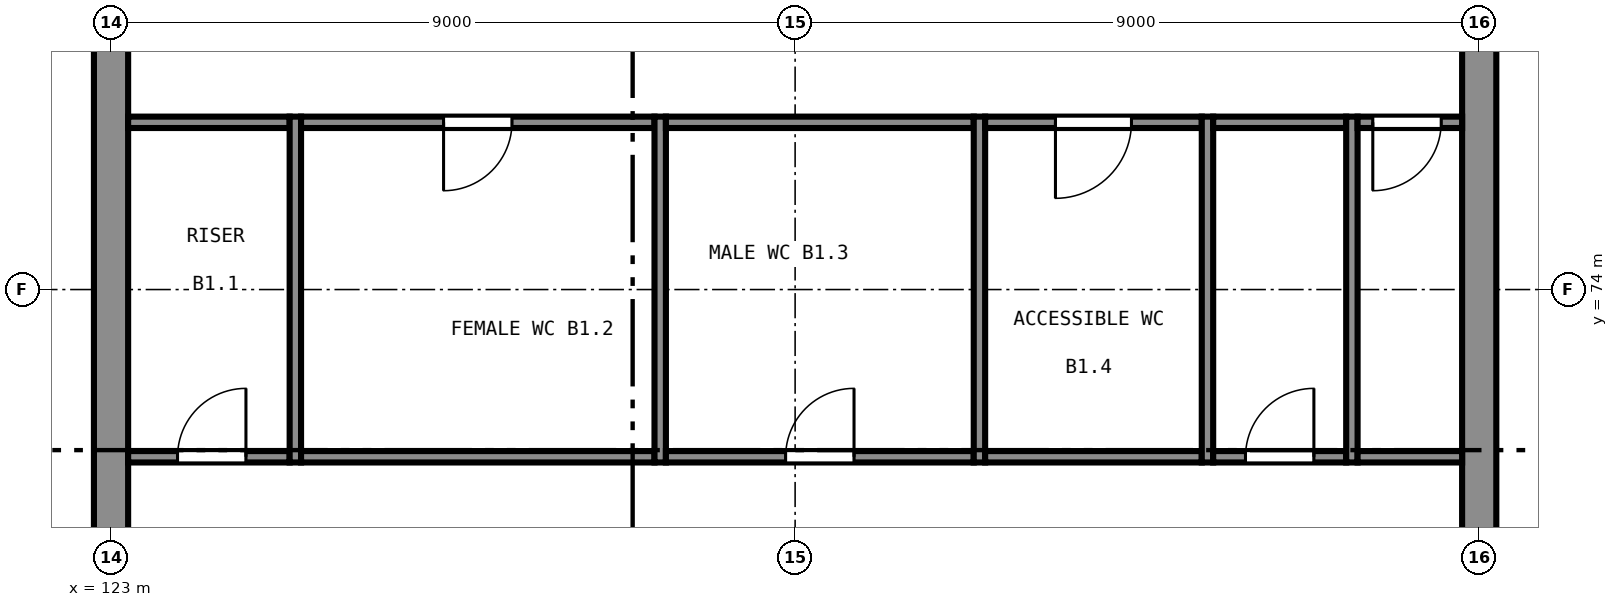
"""IFC4 building model, lengths in metres.
Left out: names, types, materials, properties, quantities, classifications, styles, units other than length and angle.
Written with IfcOpenShell. Run it as: python <this file> out.ifc"""

import sys

from ifc_helpers import new_model, si_unit, direction, frame, frame_2d, origin, place, context, subcontext, project, spatial, rectangle, extrude, element, fill, save


model = new_model("IFC4")
c1 = context("Model", 3, precision=1e-05, world=origin(), true_north=direction((0.0, 1.0)))
c2 = subcontext(c1, "Body", "Model", "MODEL_VIEW")
j1 = project(units=[si_unit("LENGTHUNIT", "METRE"), si_unit("PLANEANGLEUNIT", "RADIAN")], contexts=[c1])
p1 = place(None, origin())
s1 = spatial("IfcSite", under=j1, at=p1, CompositionType="ELEMENT")
p2 = place(p1, origin())
s2 = spatial("IfcBuilding", under=s1, at=p2, CompositionType="ELEMENT")
p3 = place(p2, frame((0.0, 0.0, -5.0)))
s3 = spatial("IfcBuildingStorey", under=s2, at=p3, CompositionType="ELEMENT", Elevation=-5.0)
p4 = place(p3, frame((141.0, 65.225, 0.0), z_axis=(0.0, 0.0, 1.0), x_axis=(0.0, 1.0, 0.0)))
e1 = element("IfcWall", 1, at=p4, inside=s3, PredefinedType="SHEAR", context=c2, shape_type="SweptSolid", body=[
    extrude(rectangle(XDim=17.55, YDim=0.45, at=frame_2d((8.775, 0.0))), origin(), (0.0, 0.0, 1.0), 5.0),
])
p5 = place(p4, frame((4.3, 0.0, 0.0)))
e2 = element("IfcOpeningElement", 2, at=p5, cuts=e1, PredefinedType="OPENING", context=c2, shape_type="SweptSolid", body=[
    extrude(rectangle(XDim=1.2, YDim=2.1, at=frame_2d((0.6, 1.05))), frame((0.0, 0.235, 0.0), z_axis=(0.0, -1.0, 0.0), x_axis=(1.0, 0.0, 0.0)), (0.0, 0.0, 1.0), 0.47),
])
p6 = place(p4, frame((12.05, 0.0, 0.0)))
e3 = element("IfcOpeningElement", 3, at=p6, cuts=e1, PredefinedType="OPENING", context=c2, shape_type="SweptSolid", body=[
    extrude(rectangle(XDim=1.2, YDim=2.1, at=frame_2d((0.6, 1.05))), frame((0.0, 0.235, 0.0), z_axis=(0.0, -1.0, 0.0), x_axis=(1.0, 0.0, 0.0)), (0.0, 0.0, 1.0), 0.47),
])
p7 = place(p3, frame((123.0, 82.775, 0.0), z_axis=(0.0, 0.0, 1.0), x_axis=(0.0, -1.0, 0.0)))
e4 = element("IfcWall", 4, at=p7, inside=s3, PredefinedType="SHEAR", context=c2, shape_type="SweptSolid", body=[
    extrude(rectangle(XDim=17.55, YDim=0.45, at=frame_2d((8.775, 0.0))), origin(), (0.0, 0.0, 1.0), 5.0),
])
p8 = place(p7, frame((12.05, 0.0, 0.0)))
e5 = element("IfcOpeningElement", 5, at=p8, cuts=e4, PredefinedType="OPENING", context=c2, shape_type="SweptSolid", body=[
    extrude(rectangle(XDim=1.2, YDim=2.1, at=frame_2d((0.6, 1.05))), frame((0.0, 0.235, 0.0), z_axis=(0.0, -1.0, 0.0), x_axis=(1.0, 0.0, 0.0)), (0.0, 0.0, 1.0), 0.47),
])
p9 = place(p7, frame((4.3, 0.0, 0.0)))
e6 = element("IfcOpeningElement", 6, at=p9, cuts=e4, PredefinedType="OPENING", context=c2, shape_type="SweptSolid", body=[
    extrude(rectangle(XDim=1.2, YDim=2.1, at=frame_2d((0.6, 1.05))), frame((0.0, 0.235, 0.0), z_axis=(0.0, -1.0, 0.0), x_axis=(1.0, 0.0, 0.0)), (0.0, 0.0, 1.0), 0.47),
])
p10 = place(p3, frame((125.425, 71.725, 0.0), z_axis=(0.0, 0.0, 1.0), x_axis=(0.0, 1.0, 0.0)))
e7 = element("IfcWall", 7, at=p10, inside=s3, PredefinedType="PARTITIONING", context=c2, shape_type="SweptSolid", body=[
    extrude(rectangle(XDim=4.55, YDim=0.15, at=frame_2d((2.275, 0.0))), origin(), (0.0, 0.0, 1.0), 4.58),
])
p11 = place(p3, frame((123.225, 71.8, 0.0), z_axis=(0.0, 0.0, 1.0), x_axis=(1.0, 0.0, 0.0)))
e8 = element("IfcWall", 8, at=p11, inside=s3, PredefinedType="PARTITIONING", context=c2, shape_type="SweptSolid", body=[
    extrude(rectangle(XDim=2.125, YDim=0.15, at=frame_2d((1.062, 0.0))), origin(), (0.0, 0.0, 1.0), 4.58),
])
p12 = place(p11, frame((0.65, 0.0, 0.0)))
e9 = element("IfcOpeningElement", 9, at=p12, cuts=e8, PredefinedType="OPENING", context=c2, shape_type="SweptSolid", body=[
    extrude(rectangle(XDim=0.9, YDim=2.1, at=frame_2d((0.45, 1.05))), frame((0.0, 0.085, 0.0), z_axis=(0.0, -1.0, 0.0), x_axis=(1.0, 0.0, 0.0)), (0.0, 0.0, 1.0), 0.17),
])
p13 = place(p3, frame((123.225, 76.2, 0.0), z_axis=(0.0, 0.0, 1.0), x_axis=(1.0, 0.0, 0.0)))
e10 = element("IfcWall", 10, at=p13, inside=s3, PredefinedType="PARTITIONING", context=c2, shape_type="SweptSolid", body=[
    extrude(rectangle(XDim=2.125, YDim=0.15, at=frame_2d((1.062, 0.0))), origin(), (0.0, 0.0, 1.0), 4.58),
])
p14 = place(p3, frame((130.225, 71.725, 0.0), z_axis=(0.0, 0.0, 1.0), x_axis=(0.0, 1.0, 0.0)))
e11 = element("IfcWall", 11, at=p14, inside=s3, PredefinedType="PARTITIONING", context=c2, shape_type="SweptSolid", body=[
    extrude(rectangle(XDim=4.55, YDim=0.15, at=frame_2d((2.275, 0.0))), origin(), (0.0, 0.0, 1.0), 4.58),
])
p15 = place(p3, frame((125.5, 71.8, 0.0), z_axis=(0.0, 0.0, 1.0), x_axis=(1.0, 0.0, 0.0)))
e12 = element("IfcWall", 12, at=p15, inside=s3, PredefinedType="PARTITIONING", context=c2, shape_type="SweptSolid", body=[
    extrude(rectangle(XDim=4.65, YDim=0.15, at=frame_2d((2.325, 0.0))), origin(), (0.0, 0.0, 1.0), 4.58),
])
p16 = place(p3, frame((125.5, 76.2, 0.0), z_axis=(0.0, 0.0, 1.0), x_axis=(1.0, 0.0, 0.0)))
e13 = element("IfcWall", 13, at=p16, inside=s3, PredefinedType="PARTITIONING", context=c2, shape_type="SweptSolid", body=[
    extrude(rectangle(XDim=4.65, YDim=0.15, at=frame_2d((2.325, 0.0))), origin(), (0.0, 0.0, 1.0), 4.58),
])
p17 = place(p16, frame((1.875, 0.0, 0.0)))
e14 = element("IfcOpeningElement", 14, at=p17, cuts=e13, PredefinedType="OPENING", context=c2, shape_type="SweptSolid", body=[
    extrude(rectangle(XDim=0.9, YDim=2.1, at=frame_2d((0.45, 1.05))), frame((0.0, 0.085, 0.0), z_axis=(0.0, -1.0, 0.0), x_axis=(1.0, 0.0, 0.0)), (0.0, 0.0, 1.0), 0.17),
])
p18 = place(p3, frame((134.425, 71.725, 0.0), z_axis=(0.0, 0.0, 1.0), x_axis=(0.0, 1.0, 0.0)))
e15 = element("IfcWall", 15, at=p18, inside=s3, PredefinedType="PARTITIONING", context=c2, shape_type="SweptSolid", body=[
    extrude(rectangle(XDim=4.55, YDim=0.15, at=frame_2d((2.275, 0.0))), origin(), (0.0, 0.0, 1.0), 4.58),
])
p19 = place(p3, frame((130.3, 71.8, 0.0), z_axis=(0.0, 0.0, 1.0), x_axis=(1.0, 0.0, 0.0)))
e16 = element("IfcWall", 16, at=p19, inside=s3, PredefinedType="PARTITIONING", context=c2, shape_type="SweptSolid", body=[
    extrude(rectangle(XDim=4.05, YDim=0.15, at=frame_2d((2.025, 0.0))), origin(), (0.0, 0.0, 1.0), 4.58),
])
p20 = place(p19, frame((1.575, 0.0, 0.0)))
e17 = element("IfcOpeningElement", 17, at=p20, cuts=e16, PredefinedType="OPENING", context=c2, shape_type="SweptSolid", body=[
    extrude(rectangle(XDim=0.9, YDim=2.1, at=frame_2d((0.45, 1.05))), frame((0.0, 0.085, 0.0), z_axis=(0.0, -1.0, 0.0), x_axis=(1.0, 0.0, 0.0)), (0.0, 0.0, 1.0), 0.17),
])
p21 = place(p3, frame((130.3, 76.2, 0.0), z_axis=(0.0, 0.0, 1.0), x_axis=(1.0, 0.0, 0.0)))
e18 = element("IfcWall", 18, at=p21, inside=s3, PredefinedType="PARTITIONING", context=c2, shape_type="SweptSolid", body=[
    extrude(rectangle(XDim=4.05, YDim=0.15, at=frame_2d((2.025, 0.0))), origin(), (0.0, 0.0, 1.0), 4.58),
])
p22 = place(p3, frame((137.425, 71.725, 0.0), z_axis=(0.0, 0.0, 1.0), x_axis=(0.0, 1.0, 0.0)))
e19 = element("IfcWall", 19, at=p22, inside=s3, PredefinedType="PARTITIONING", context=c2, shape_type="SweptSolid", body=[
    extrude(rectangle(XDim=4.55, YDim=0.15, at=frame_2d((2.275, 0.0))), origin(), (0.0, 0.0, 1.0), 4.58),
])
p23 = place(p3, frame((134.5, 71.8, 0.0), z_axis=(0.0, 0.0, 1.0), x_axis=(1.0, 0.0, 0.0)))
e20 = element("IfcWall", 20, at=p23, inside=s3, PredefinedType="PARTITIONING", context=c2, shape_type="SweptSolid", body=[
    extrude(rectangle(XDim=2.85, YDim=0.15, at=frame_2d((1.425, 0.0))), origin(), (0.0, 0.0, 1.0), 4.58),
])
p24 = place(p3, frame((134.5, 76.2, 0.0), z_axis=(0.0, 0.0, 1.0), x_axis=(1.0, 0.0, 0.0)))
e21 = element("IfcWall", 21, at=p24, inside=s3, PredefinedType="PARTITIONING", context=c2, shape_type="SweptSolid", body=[
    extrude(rectangle(XDim=2.85, YDim=0.15, at=frame_2d((1.425, 0.0))), origin(), (0.0, 0.0, 1.0), 4.58),
])
p25 = place(p24, frame((0.925, 0.0, 0.0)))
e22 = element("IfcOpeningElement", 22, at=p25, cuts=e21, PredefinedType="OPENING", context=c2, shape_type="SweptSolid", body=[
    extrude(rectangle(XDim=1.0, YDim=2.1, at=frame_2d((0.5, 1.05))), frame((0.0, 0.085, 0.0), z_axis=(0.0, -1.0, 0.0), x_axis=(1.0, 0.0, 0.0)), (0.0, 0.0, 1.0), 0.17),
])
p26 = place(p3, frame((139.325, 71.725, 0.0), z_axis=(0.0, 0.0, 1.0), x_axis=(0.0, 1.0, 0.0)))
e23 = element("IfcWall", 23, at=p26, inside=s3, PredefinedType="PARTITIONING", context=c2, shape_type="SweptSolid", body=[
    extrude(rectangle(XDim=4.55, YDim=0.15, at=frame_2d((2.275, 0.0))), origin(), (0.0, 0.0, 1.0), 4.58),
])
p27 = place(p3, frame((137.5, 71.8, 0.0), z_axis=(0.0, 0.0, 1.0), x_axis=(1.0, 0.0, 0.0)))
e24 = element("IfcWall", 24, at=p27, inside=s3, PredefinedType="PARTITIONING", context=c2, shape_type="SweptSolid", body=[
    extrude(rectangle(XDim=1.75, YDim=0.15, at=frame_2d((0.875, 0.0))), origin(), (0.0, 0.0, 1.0), 4.58),
])
p28 = place(p27, frame((0.425, 0.0, 0.0)))
e25 = element("IfcOpeningElement", 25, at=p28, cuts=e24, PredefinedType="OPENING", context=c2, shape_type="SweptSolid", body=[
    extrude(rectangle(XDim=0.9, YDim=2.1, at=frame_2d((0.45, 1.05))), frame((0.0, 0.085, 0.0), z_axis=(0.0, -1.0, 0.0), x_axis=(1.0, 0.0, 0.0)), (0.0, 0.0, 1.0), 0.17),
])
p29 = place(p3, frame((137.5, 76.2, 0.0), z_axis=(0.0, 0.0, 1.0), x_axis=(1.0, 0.0, 0.0)))
e26 = element("IfcWall", 26, at=p29, inside=s3, PredefinedType="PARTITIONING", context=c2, shape_type="SweptSolid", body=[
    extrude(rectangle(XDim=1.75, YDim=0.15, at=frame_2d((0.875, 0.0))), origin(), (0.0, 0.0, 1.0), 4.58),
])
p30 = place(p3, frame((139.4, 71.8, 0.0), z_axis=(0.0, 0.0, 1.0), x_axis=(1.0, 0.0, 0.0)))
e27 = element("IfcWall", 27, at=p30, inside=s3, PredefinedType="PARTITIONING", context=c2, shape_type="SweptSolid", body=[
    extrude(rectangle(XDim=1.375, YDim=0.15, at=frame_2d((0.688, 0.0))), origin(), (0.0, 0.0, 1.0), 4.58),
])
p31 = place(p3, frame((139.4, 76.2, 0.0), z_axis=(0.0, 0.0, 1.0), x_axis=(1.0, 0.0, 0.0)))
e28 = element("IfcWall", 28, at=p31, inside=s3, PredefinedType="PARTITIONING", context=c2, shape_type="SweptSolid", body=[
    extrude(rectangle(XDim=1.375, YDim=0.15, at=frame_2d((0.688, 0.0))), origin(), (0.0, 0.0, 1.0), 4.58),
])
p32 = place(p31, frame((0.2, 0.0, 0.0)))
e29 = element("IfcOpeningElement", 29, at=p32, cuts=e28, PredefinedType="OPENING", context=c2, shape_type="SweptSolid", body=[
    extrude(rectangle(XDim=0.9, YDim=2.1, at=frame_2d((0.45, 1.05))), frame((0.0, 0.085, 0.0), z_axis=(0.0, -1.0, 0.0), x_axis=(1.0, 0.0, 0.0)), (0.0, 0.0, 1.0), 0.17),
])
p33 = place(p12, origin())
e30 = element("IfcDoor", 30, at=p33, inside=s3, OperationType="SINGLE_SWING_LEFT", PredefinedType="DOOR", context=c2, shape_type="SweptSolid", body=[
    extrude(rectangle(XDim=0.9, YDim=2.1, at=frame_2d((0.45, 1.05))), frame((0.0, 0.025, 0.0), z_axis=(0.0, -1.0, 0.0), x_axis=(1.0, 0.0, 0.0)), (0.0, 0.0, 1.0), 0.05),
])
fill(e9, e30)
p34 = place(p17, frame((0.9, 0.0, 0.0), z_axis=(0.0, 0.0, 1.0), x_axis=(-1.0, 0.0, 0.0)))
e31 = element("IfcDoor", 31, at=p34, inside=s3, OperationType="SINGLE_SWING_LEFT", PredefinedType="DOOR", context=c2, shape_type="SweptSolid", body=[
    extrude(rectangle(XDim=0.9, YDim=2.1, at=frame_2d((0.45, 1.05))), frame((0.0, 0.025, 0.0), z_axis=(0.0, -1.0, 0.0), x_axis=(1.0, 0.0, 0.0)), (0.0, 0.0, 1.0), 0.05),
])
fill(e14, e31)
p35 = place(p20, origin())
e32 = element("IfcDoor", 32, at=p35, inside=s3, OperationType="SINGLE_SWING_LEFT", PredefinedType="DOOR", context=c2, shape_type="SweptSolid", body=[
    extrude(rectangle(XDim=0.9, YDim=2.1, at=frame_2d((0.45, 1.05))), frame((0.0, 0.025, 0.0), z_axis=(0.0, -1.0, 0.0), x_axis=(1.0, 0.0, 0.0)), (0.0, 0.0, 1.0), 0.05),
])
fill(e17, e32)
p36 = place(p25, frame((1.0, 0.0, 0.0), z_axis=(0.0, 0.0, 1.0), x_axis=(-1.0, 0.0, 0.0)))
e33 = element("IfcDoor", 33, at=p36, inside=s3, OperationType="SINGLE_SWING_LEFT", PredefinedType="DOOR", context=c2, shape_type="SweptSolid", body=[
    extrude(rectangle(XDim=1.0, YDim=2.1, at=frame_2d((0.5, 1.05))), frame((0.0, 0.025, 0.0), z_axis=(0.0, -1.0, 0.0), x_axis=(1.0, 0.0, 0.0)), (0.0, 0.0, 1.0), 0.05),
])
fill(e22, e33)
p37 = place(p28, origin())
e34 = element("IfcDoor", 34, at=p37, inside=s3, OperationType="SINGLE_SWING_LEFT", PredefinedType="DOOR", context=c2, shape_type="SweptSolid", body=[
    extrude(rectangle(XDim=0.9, YDim=2.1, at=frame_2d((0.45, 1.05))), frame((0.0, 0.025, 0.0), z_axis=(0.0, -1.0, 0.0), x_axis=(1.0, 0.0, 0.0)), (0.0, 0.0, 1.0), 0.05),
])
fill(e25, e34)
p38 = place(p32, frame((0.9, 0.0, 0.0), z_axis=(0.0, 0.0, 1.0), x_axis=(-1.0, 0.0, 0.0)))
e35 = element("IfcDoor", 35, at=p38, inside=s3, OperationType="SINGLE_SWING_LEFT", PredefinedType="DOOR", context=c2, shape_type="SweptSolid", body=[
    extrude(rectangle(XDim=0.9, YDim=2.1, at=frame_2d((0.45, 1.05))), frame((0.0, 0.025, 0.0), z_axis=(0.0, -1.0, 0.0), x_axis=(1.0, 0.0, 0.0)), (0.0, 0.0, 1.0), 0.05),
])
fill(e29, e35)
save(model, sys.argv[1])
